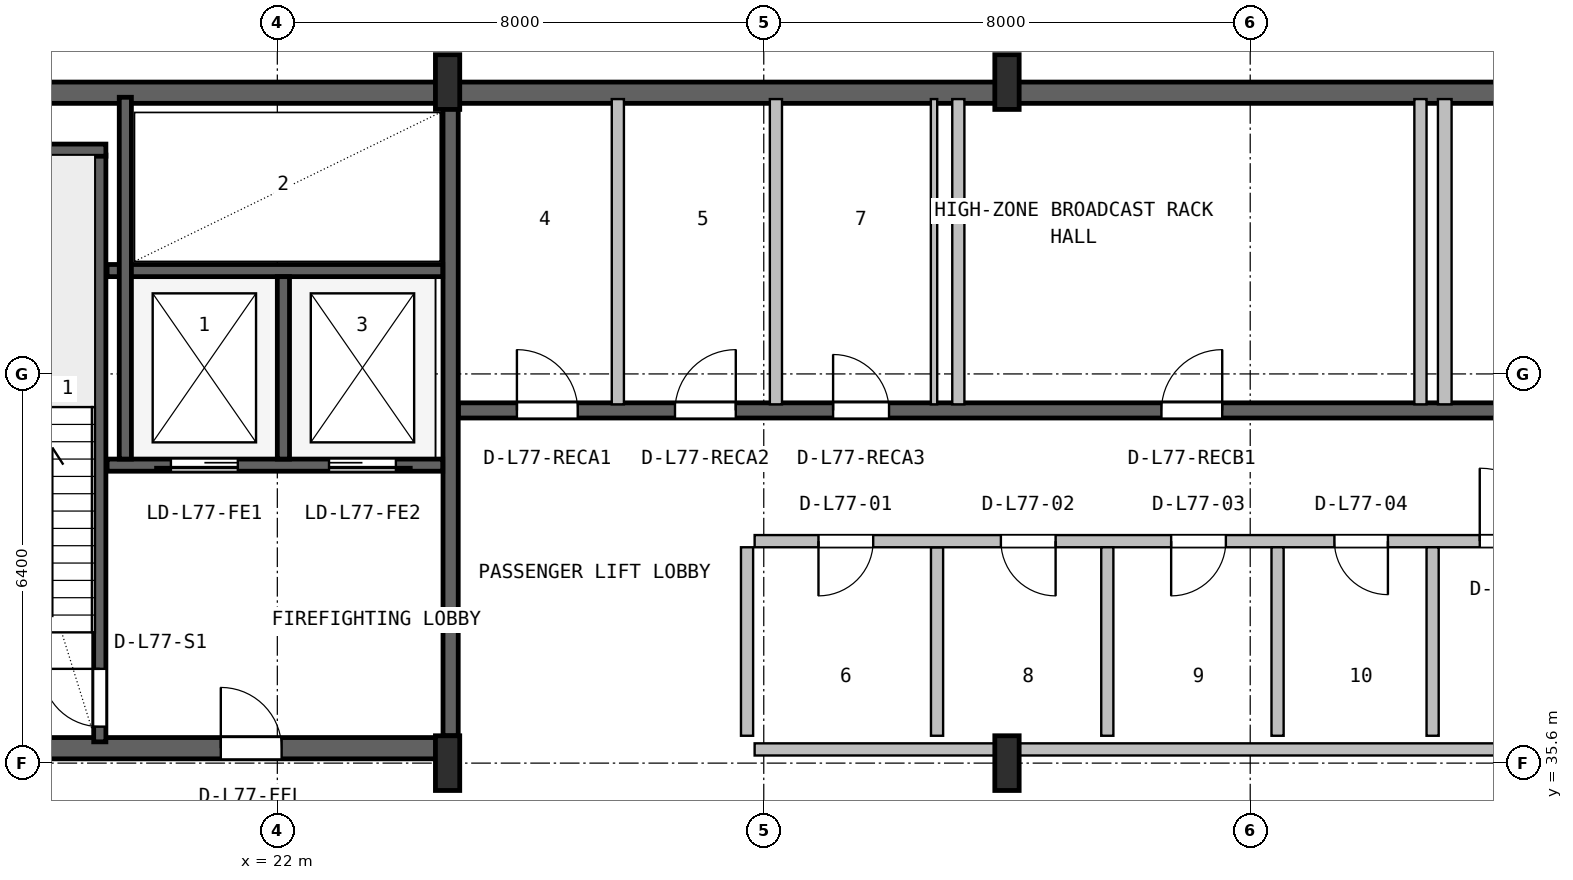
"""IFC4 building model, lengths in metres.
Left out: names, types, materials, properties, quantities, classifications, styles, units other than length and angle.
Written with IfcOpenShell. Run it as: python <this file> out.ifc"""

import sys

from ifc_helpers import new_model, si_unit, direction, frame, frame_2d, origin, origin_2d, place, context, subcontext, project, spatial, rectangle, i_section, extrude, source, transform, mapped, element, fill, save


model = new_model("IFC4")
c1 = context("Model", 3, precision=1e-05, world=origin(), true_north=direction((0.0, 1.0)))
c2 = subcontext(c1, "Body", "Model", "MODEL_VIEW")
j1 = project(units=[si_unit("LENGTHUNIT", "METRE"), si_unit("PLANEANGLEUNIT", "RADIAN")], contexts=[c1])
p1 = place(None, origin())
s1 = spatial("IfcSite", under=j1, at=p1, CompositionType="ELEMENT")
p2 = place(p1, origin())
s2 = spatial("IfcBuilding", under=s1, at=p2, CompositionType="ELEMENT")
p3 = place(p2, frame((0.0, 0.0, 309.8)))
s3 = spatial("IfcBuildingStorey", under=s2, at=p3, CompositionType="ELEMENT", Elevation=309.8)
p4 = place(p3, frame((15.325, 46.625, 0.0), z_axis=(0.0, 0.0, 1.0), x_axis=(1.0, 0.0, 0.0)))
e1 = element("IfcWall", 1, at=p4, inside=s3, PredefinedType="SHEAR", context=c2, shape_type="SweptSolid", body=[
    extrude(rectangle(XDim=37.35, YDim=0.35, at=frame_2d((18.675, 0.0))), origin(), (0.0, 0.0, 1.0), 4.48),
])
p5 = place(p3, frame((15.67, 35.845, 0.0), z_axis=(0.0, 0.0, 1.0), x_axis=(1.0, 0.0, 0.0)))
e2 = element("IfcWall", 2, at=p5, inside=s3, PredefinedType="SHEAR", context=c2, shape_type="SweptSolid", body=[
    extrude(rectangle(XDim=9.13, YDim=0.35, at=frame_2d((4.565, 0.0))), origin(), (0.0, 0.0, 1.0), 4.48),
])
p6 = place(p5, frame((5.4, 0.0, 0.0)))
e3 = element("IfcOpeningElement", 3, at=p6, cuts=e2, PredefinedType="OPENING", context=c2, shape_type="SweptSolid", body=[
    extrude(rectangle(XDim=1.0, YDim=2.1, at=frame_2d((0.5, 1.05))), frame((0.0, 0.185, 0.0), z_axis=(0.0, -1.0, 0.0), x_axis=(1.0, 0.0, 0.0)), (0.0, 0.0, 1.0), 0.37),
])
m1 = source(origin(), c2, "Body", "SweptSolid", [
    extrude(i_section(OverallWidth=0.4, OverallDepth=0.9, WebThickness=0.016, FlangeThickness=0.028, FilletRadius=0.016, at=origin_2d()), origin(), (0.0, 0.0, 1.0), 4.8),
])
for number, where, z_axis, x_axis in (
    (4, (24.8, 35.6, 0.0), (0.0, 0.0, 1.0), (1.0, 0.0, 0.0)),
    (5, (24.8, 46.8, 0.0), (0.0, 0.0, 1.0), (1.0, 0.0, 0.0)),
    (6, (34.0, 35.6, 0.0), (0.0, 0.0, 1.0), (1.0, 0.0, 0.0)),
    (7, (34.0, 46.8, 0.0), (0.0, 0.0, 1.0), (1.0, 0.0, 0.0)),
):
    element("IfcColumn", number, at=place(p3, frame(where, z_axis=z_axis, x_axis=x_axis)), inside=s3, PredefinedType="COLUMN", context=c2, shape_type="MappedRepresentation", body=[
        mapped(m1, transform((0.0, 0.0, 0.0), x_axis=(1.0, 0.0, 0.0), y_axis=(0.0, 1.0, 0.0), z_axis=(0.0, 0.0, 1.0), scale=1.0)),
    ])
p7 = place(p3, frame((19.08, 35.95, 0.0), z_axis=(0.0, 0.0, 1.0), x_axis=(0.0, 1.0, 0.0)))
e8 = element("IfcWall", 8, at=p7, inside=s3, PredefinedType="SHEAR", context=c2, shape_type="SweptSolid", body=[
    extrude(rectangle(XDim=9.65, YDim=0.2, at=frame_2d((4.825, 0.0))), origin(), (0.0, 0.0, 1.0), 4.48),
])
p8 = place(p7, frame((0.25, 0.0, 0.0)))
e9 = element("IfcOpeningElement", 9, at=p8, cuts=e8, PredefinedType="OPENING", context=c2, shape_type="SweptSolid", body=[
    extrude(rectangle(XDim=0.95, YDim=2.1, at=frame_2d((0.475, 1.05))), frame((0.0, 0.11, 0.0), z_axis=(0.0, -1.0, 0.0), x_axis=(1.0, 0.0, 0.0)), (0.0, 0.0, 1.0), 0.22),
])
p9 = place(p3, frame((15.95, 45.68, 0.0), z_axis=(0.0, 0.0, 1.0), x_axis=(1.0, 0.0, 0.0)))
e10 = element("IfcWall", 10, at=p9, inside=s3, PredefinedType="SHEAR", context=c2, shape_type="SweptSolid", body=[
    extrude(rectangle(XDim=3.23, YDim=0.2, at=frame_2d((1.615, 0.0))), origin(), (0.0, 0.0, 1.0), 4.48),
])
p10 = place(p3, frame((24.85, 36.05, 0.0), z_axis=(0.0, 0.0, 1.0), x_axis=(0.0, 1.0, 0.0)))
e11 = element("IfcWall", 11, at=p10, inside=s3, PredefinedType="SHEAR", context=c2, shape_type="SweptSolid", body=[
    extrude(rectangle(XDim=10.45, YDim=0.25, at=frame_2d((5.225, 0.0))), origin(), (0.0, 0.0, 1.0), 4.48),
])
p11 = place(p3, frame((19.2, 40.5, 0.0), z_axis=(0.0, 0.0, 1.0), x_axis=(1.0, 0.0, 0.0)))
e12 = element("IfcWall", 12, at=p11, inside=s3, PredefinedType="SHEAR", context=c2, shape_type="SweptSolid", body=[
    extrude(rectangle(XDim=5.52, YDim=0.2, at=frame_2d((2.76, 0.0))), origin(), (0.0, 0.0, 1.0), 4.48),
])
p12 = place(p11, frame((1.05, 0.0, 0.0)))
e13 = element("IfcOpeningElement", 13, at=p12, cuts=e12, PredefinedType="OPENING", context=c2, shape_type="SweptSolid", body=[
    extrude(rectangle(XDim=1.1, YDim=2.18, at=frame_2d((0.55, 1.09))), frame((0.0, 0.11, 0.0), z_axis=(0.0, -1.0, 0.0), x_axis=(1.0, 0.0, 0.0)), (0.0, 0.0, 1.0), 0.22),
])
p13 = place(p11, frame((3.65, 0.0, 0.0)))
e14 = element("IfcOpeningElement", 14, at=p13, cuts=e12, PredefinedType="OPENING", context=c2, shape_type="SweptSolid", body=[
    extrude(rectangle(XDim=1.1, YDim=2.18, at=frame_2d((0.55, 1.09))), frame((0.0, 0.11, 0.0), z_axis=(0.0, -1.0, 0.0), x_axis=(1.0, 0.0, 0.0)), (0.0, 0.0, 1.0), 0.22),
])
p14 = place(p3, frame((19.2, 43.7, 0.0), z_axis=(0.0, 0.0, 1.0), x_axis=(1.0, 0.0, 0.0)))
e15 = element("IfcWall", 15, at=p14, inside=s3, PredefinedType="SHEAR", context=c2, shape_type="SweptSolid", body=[
    extrude(rectangle(XDim=5.52, YDim=0.2, at=frame_2d((2.76, 0.0))), origin(), (0.0, 0.0, 1.0), 4.48),
])
p15 = place(p3, frame((22.1, 40.6, 0.0), z_axis=(0.0, 0.0, 1.0), x_axis=(0.0, 1.0, 0.0)))
e16 = element("IfcWall", 16, at=p15, inside=s3, PredefinedType="SHEAR", context=c2, shape_type="SweptSolid", body=[
    extrude(rectangle(XDim=3.0, YDim=0.2, at=frame_2d((1.5, 0.0))), origin(), (0.0, 0.0, 1.0), 4.48),
])
p16 = place(p3, frame((19.5, 40.6, 0.0), z_axis=(0.0, 0.0, 1.0), x_axis=(0.0, 1.0, 0.0)))
e17 = element("IfcWall", 17, at=p16, inside=s3, PredefinedType="SHEAR", context=c2, shape_type="SweptSolid", body=[
    extrude(rectangle(XDim=5.95, YDim=0.2, at=frame_2d((2.975, 0.0))), origin(), (0.0, 0.0, 1.0), 4.48),
])
p17 = place(p3, frame((24.98, 41.4, 0.0), z_axis=(0.0, 0.0, 1.0), x_axis=(1.0, 0.0, 0.0)))
e18 = element("IfcWall", 18, at=p17, inside=s3, PredefinedType="SHEAR", context=c2, shape_type="SweptSolid", body=[
    extrude(rectangle(XDim=23.82, YDim=0.25, at=frame_2d((11.91, 0.0))), origin(), (0.0, 0.0, 1.0), 4.48),
])
p18 = place(p17, frame((0.96, 0.0, 0.0)))
e19 = element("IfcOpeningElement", 19, at=p18, cuts=e18, PredefinedType="OPENING", context=c2, shape_type="SweptSolid", body=[
    extrude(rectangle(XDim=1.0, YDim=2.08, at=frame_2d((0.5, 1.04))), frame((0.0, 0.135, 0.0), z_axis=(0.0, -1.0, 0.0), x_axis=(1.0, 0.0, 0.0)), (0.0, 0.0, 1.0), 0.27),
])
p19 = place(p17, frame((3.56, 0.0, 0.0)))
e20 = element("IfcOpeningElement", 20, at=p19, cuts=e18, PredefinedType="OPENING", context=c2, shape_type="SweptSolid", body=[
    extrude(rectangle(XDim=1.0, YDim=2.08, at=frame_2d((0.5, 1.04))), frame((0.0, 0.135, 0.0), z_axis=(0.0, -1.0, 0.0), x_axis=(1.0, 0.0, 0.0)), (0.0, 0.0, 1.0), 0.27),
])
p20 = place(p17, frame((6.16, 0.0, 0.0)))
e21 = element("IfcOpeningElement", 21, at=p20, cuts=e18, PredefinedType="OPENING", context=c2, shape_type="SweptSolid", body=[
    extrude(rectangle(XDim=0.92, YDim=2.08, at=frame_2d((0.46, 1.04))), frame((0.0, 0.135, 0.0), z_axis=(0.0, -1.0, 0.0), x_axis=(1.0, 0.0, 0.0)), (0.0, 0.0, 1.0), 0.27),
])
p21 = place(p17, frame((11.56, 0.0, 0.0)))
e22 = element("IfcOpeningElement", 22, at=p21, cuts=e18, PredefinedType="OPENING", context=c2, shape_type="SweptSolid", body=[
    extrude(rectangle(XDim=1.0, YDim=2.08, at=frame_2d((0.5, 1.04))), frame((0.0, 0.135, 0.0), z_axis=(0.0, -1.0, 0.0), x_axis=(1.0, 0.0, 0.0)), (0.0, 0.0, 1.0), 0.27),
])
p22 = place(p17, frame((19.56, 0.0, 0.0)))
e23 = element("IfcOpeningElement", 23, at=p22, cuts=e18, PredefinedType="OPENING", context=c2, shape_type="SweptSolid", body=[
    extrude(rectangle(XDim=0.92, YDim=2.08, at=frame_2d((0.46, 1.04))), frame((0.0, 0.135, 0.0), z_axis=(0.0, -1.0, 0.0), x_axis=(1.0, 0.0, 0.0)), (0.0, 0.0, 1.0), 0.27),
])
p23 = place(p3, frame((29.85, 35.825, 0.0), z_axis=(0.0, 0.0, 1.0), x_axis=(1.0, 0.0, 0.0)))
e24 = element("IfcWall", 24, at=p23, inside=s3, PredefinedType="SOLIDWALL", context=c2, shape_type="SweptSolid", body=[
    extrude(rectangle(XDim=13.7, YDim=0.2, at=frame_2d((6.85, 0.0))), origin(), (0.0, 0.0, 1.0), 3.505),
])
p24 = place(p3, frame((32.85, 36.05, 0.0), z_axis=(0.0, 0.0, 1.0), x_axis=(0.0, 1.0, 0.0)))
e25 = element("IfcWall", 25, at=p24, inside=s3, PredefinedType="PLUMBINGWALL", context=c2, shape_type="SweptSolid", body=[
    extrude(rectangle(XDim=3.1, YDim=0.2, at=frame_2d((1.55, 0.0))), origin(), (0.0, 0.0, 1.0), 4.46),
])
p25 = place(p3, frame((29.85, 39.25, 0.0), z_axis=(0.0, 0.0, 1.0), x_axis=(1.0, 0.0, 0.0)))
e26 = element("IfcWall", 26, at=p25, inside=s3, PredefinedType="SOLIDWALL", context=c2, shape_type="SweptSolid", body=[
    extrude(rectangle(XDim=13.7, YDim=0.2, at=frame_2d((6.85, 0.0))), origin(), (0.0, 0.0, 1.0), 4.46),
])
p26 = place(p25, frame((1.05, 0.0, 0.0)))
e27 = element("IfcOpeningElement", 27, at=p26, cuts=e26, PredefinedType="OPENING", context=c2, shape_type="SweptSolid", body=[
    extrude(rectangle(XDim=0.9, YDim=2.06, at=frame_2d((0.45, 1.03))), frame((0.0, 0.11, 0.0), z_axis=(0.0, -1.0, 0.0), x_axis=(1.0, 0.0, 0.0)), (0.0, 0.0, 1.0), 0.22),
])
p27 = place(p25, frame((4.05, 0.0, 0.0)))
e28 = element("IfcOpeningElement", 28, at=p27, cuts=e26, PredefinedType="OPENING", context=c2, shape_type="SweptSolid", body=[
    extrude(rectangle(XDim=0.9, YDim=2.06, at=frame_2d((0.45, 1.03))), frame((0.0, 0.11, 0.0), z_axis=(0.0, -1.0, 0.0), x_axis=(1.0, 0.0, 0.0)), (0.0, 0.0, 1.0), 0.22),
])
p28 = place(p25, frame((6.85, 0.0, 0.0)))
e29 = element("IfcOpeningElement", 29, at=p28, cuts=e26, PredefinedType="OPENING", context=c2, shape_type="SweptSolid", body=[
    extrude(rectangle(XDim=0.9, YDim=2.06, at=frame_2d((0.45, 1.03))), frame((0.0, 0.11, 0.0), z_axis=(0.0, -1.0, 0.0), x_axis=(1.0, 0.0, 0.0)), (0.0, 0.0, 1.0), 0.22),
])
p29 = place(p25, frame((9.535, 0.0, 0.0)))
e30 = element("IfcOpeningElement", 30, at=p29, cuts=e26, PredefinedType="OPENING", context=c2, shape_type="SweptSolid", body=[
    extrude(rectangle(XDim=0.88, YDim=2.06, at=frame_2d((0.44, 1.03))), frame((0.0, 0.11, 0.0), z_axis=(0.0, -1.0, 0.0), x_axis=(1.0, 0.0, 0.0)), (0.0, 0.0, 1.0), 0.22),
])
p30 = place(p25, frame((11.925, 0.0, 0.0)))
e31 = element("IfcOpeningElement", 31, at=p30, cuts=e26, PredefinedType="OPENING", context=c2, shape_type="SweptSolid", body=[
    extrude(rectangle(XDim=1.2, YDim=2.1, at=frame_2d((0.6, 1.05))), frame((0.0, 0.11, 0.0), z_axis=(0.0, -1.0, 0.0), x_axis=(1.0, 0.0, 0.0)), (0.0, 0.0, 1.0), 0.22),
])
for number, where, z_axis, x_axis in (
    (32, (29.725, 36.05, 0.0), (0.0, 0.0, 1.0), (0.0, 1.0, 0.0)),
    (33, (35.65, 36.05, 0.0), (0.0, 0.0, 1.0), (0.0, 1.0, 0.0)),
    (34, (38.45, 36.05, 0.0), (0.0, 0.0, 1.0), (0.0, 1.0, 0.0)),
):
    element("IfcWall", number, at=place(p3, frame(where, z_axis=z_axis, x_axis=x_axis)), inside=s3, PredefinedType="PLUMBINGWALL", context=c2, shape_type="SweptSolid", body=[
        extrude(rectangle(XDim=3.1, YDim=0.2, at=frame_2d((1.55, 0.0))), origin(), (0.0, 0.0, 1.0), 4.46),
    ])
p31 = place(p3, frame((41.0, 36.05, 0.0), z_axis=(0.0, 0.0, 1.0), x_axis=(0.0, 1.0, 0.0)))
e35 = element("IfcWall", 35, at=p31, inside=s3, PredefinedType="SOLIDWALL", context=c2, shape_type="SweptSolid", body=[
    extrude(rectangle(XDim=3.1, YDim=0.2, at=frame_2d((1.55, 0.0))), origin(), (0.0, 0.0, 1.0), 4.46),
])
for number, where, z_axis, x_axis in (
    (36, (27.6, 41.5, 0.0), (0.0, 0.0, 1.0), (0.0, 1.0, 0.0)),
    (37, (30.2, 41.5, 0.0), (0.0, 0.0, 1.0), (0.0, 1.0, 0.0)),
):
    element("IfcWall", number, at=place(p3, frame(where, z_axis=z_axis, x_axis=x_axis)), inside=s3, PredefinedType="SOLIDWALL", context=c2, shape_type="SweptSolid", body=[
        extrude(rectangle(XDim=5.02, YDim=0.2, at=frame_2d((2.51, 0.0))), origin(), (0.0, 0.0, 1.0), 4.46),
    ])
p32 = place(p3, frame((32.8, 41.5, 0.0), z_axis=(0.0, 0.0, 1.0), x_axis=(0.0, 1.0, 0.0)))
e38 = element("IfcWall", 38, at=p32, inside=s3, PredefinedType="PARTITIONING", context=c2, shape_type="SweptSolid", body=[
    extrude(rectangle(XDim=5.02, YDim=0.105, at=frame_2d((2.51, 0.0))), origin(), (0.0, 0.0, 1.0), 4.46),
])
for number, where, z_axis, x_axis in (
    (39, (40.8, 41.5, 0.0), (0.0, 0.0, 1.0), (0.0, 1.0, 0.0)),
    (40, (33.2, 41.5, 0.0), (0.0, 0.0, 1.0), (0.0, 1.0, 0.0)),
):
    element("IfcWall", number, at=place(p3, frame(where, z_axis=z_axis, x_axis=x_axis)), inside=s3, PredefinedType="SOLIDWALL", context=c2, shape_type="SweptSolid", body=[
        extrude(rectangle(XDim=5.02, YDim=0.2, at=frame_2d((2.51, 0.0))), origin(), (0.0, 0.0, 1.0), 4.46),
    ])
p33 = place(p3, frame((41.2, 41.5, 0.0), z_axis=(0.0, 0.0, 1.0), x_axis=(0.0, 1.0, 0.0)))
e41 = element("IfcWall", 41, at=p33, inside=s3, PredefinedType="PARTITIONING", context=c2, shape_type="SweptSolid", body=[
    extrude(rectangle(XDim=5.02, YDim=0.225, at=frame_2d((2.51, 0.0))), origin(), (0.0, 0.0, 1.0), 4.46),
])
m2 = source(origin(), c2, "Body", "SweptSolid", [
    extrude(rectangle(XDim=0.95, YDim=2.1, at=frame_2d((0.475, 1.05))), frame((0.0, 0.025, 0.0), z_axis=(0.0, -1.0, 0.0), x_axis=(1.0, 0.0, 0.0)), (0.0, 0.0, 1.0), 0.05),
])
p34 = place(p8, origin())
e42 = element("IfcDoor", 42, at=p34, inside=s3, OperationType="SINGLE_SWING_RIGHT", PredefinedType="DOOR", context=c2, shape_type="MappedRepresentation", body=[
    mapped(m2, transform((0.0, 0.0, 0.0), x_axis=(1.0, 0.0, 0.0), y_axis=(0.0, 1.0, 0.0), z_axis=(0.0, 0.0, 1.0), scale=1.0)),
])
fill(e9, e42)
m3 = source(origin(), c2, "Body", "SweptSolid", [
    extrude(rectangle(XDim=1.0, YDim=2.1, at=frame_2d((0.5, 1.05))), frame((0.0, 0.025, 0.0), z_axis=(0.0, -1.0, 0.0), x_axis=(1.0, 0.0, 0.0)), (0.0, 0.0, 1.0), 0.05),
])
p35 = place(p6, origin())
e43 = element("IfcDoor", 43, at=p35, inside=s3, OperationType="SINGLE_SWING_LEFT", PredefinedType="DOOR", context=c2, shape_type="MappedRepresentation", body=[
    mapped(m3, transform((0.0, 0.0, 0.0), x_axis=(1.0, 0.0, 0.0), y_axis=(0.0, 1.0, 0.0), z_axis=(0.0, 0.0, 1.0), scale=1.0)),
])
fill(e3, e43)
m4 = source(origin(), c2, "Body", "SweptSolid", [
    extrude(rectangle(XDim=1.1, YDim=2.18, at=frame_2d((0.55, 1.09))), frame((0.0, 0.025, 0.0), z_axis=(0.0, -1.0, 0.0), x_axis=(1.0, 0.0, 0.0)), (0.0, 0.0, 1.0), 0.05),
])
p36 = place(p12, frame((1.1, 0.0, 0.0), z_axis=(0.0, 0.0, 1.0), x_axis=(-1.0, 0.0, 0.0)))
e44 = element("IfcDoor", 44, at=p36, inside=s3, OperationType="SLIDING_TO_LEFT", PredefinedType="DOOR", context=c2, shape_type="MappedRepresentation", body=[
    mapped(m4, transform((0.0, 0.0, 0.0), x_axis=(1.0, 0.0, 0.0), y_axis=(0.0, 1.0, 0.0), z_axis=(0.0, 0.0, 1.0), scale=1.0)),
])
fill(e13, e44)
p37 = place(p13, frame((1.1, 0.0, 0.0), z_axis=(0.0, 0.0, 1.0), x_axis=(-1.0, 0.0, 0.0)))
e45 = element("IfcDoor", 45, at=p37, inside=s3, OperationType="SLIDING_TO_RIGHT", PredefinedType="DOOR", context=c2, shape_type="MappedRepresentation", body=[
    mapped(m4, transform((0.0, 0.0, 0.0), x_axis=(1.0, 0.0, 0.0), y_axis=(0.0, 1.0, 0.0), z_axis=(0.0, 0.0, 1.0), scale=1.0)),
])
fill(e14, e45)
m5 = source(origin(), c2, "Body", "SweptSolid", [
    extrude(rectangle(XDim=1.0, YDim=2.08, at=frame_2d((0.5, 1.04))), frame((0.0, 0.025, 0.0), z_axis=(0.0, -1.0, 0.0), x_axis=(1.0, 0.0, 0.0)), (0.0, 0.0, 1.0), 0.05),
])
p38 = place(p18, origin())
e46 = element("IfcDoor", 46, at=p38, inside=s3, OperationType="SINGLE_SWING_LEFT", PredefinedType="DOOR", context=c2, shape_type="MappedRepresentation", body=[
    mapped(m5, transform((0.0, 0.0, 0.0), x_axis=(1.0, 0.0, 0.0), y_axis=(0.0, 1.0, 0.0), z_axis=(0.0, 0.0, 1.0), scale=1.0)),
])
fill(e19, e46)
p39 = place(p19, origin())
e47 = element("IfcDoor", 47, at=p39, inside=s3, OperationType="SINGLE_SWING_RIGHT", PredefinedType="DOOR", context=c2, shape_type="MappedRepresentation", body=[
    mapped(m5, transform((0.0, 0.0, 0.0), x_axis=(1.0, 0.0, 0.0), y_axis=(0.0, 1.0, 0.0), z_axis=(0.0, 0.0, 1.0), scale=1.0)),
])
fill(e20, e47)
m6 = source(origin(), c2, "Body", "SweptSolid", [
    extrude(rectangle(XDim=0.92, YDim=2.08, at=frame_2d((0.46, 1.04))), frame((0.0, 0.025, 0.0), z_axis=(0.0, -1.0, 0.0), x_axis=(1.0, 0.0, 0.0)), (0.0, 0.0, 1.0), 0.05),
])
p40 = place(p20, origin())
e48 = element("IfcDoor", 48, at=p40, inside=s3, OperationType="SINGLE_SWING_LEFT", PredefinedType="DOOR", context=c2, shape_type="MappedRepresentation", body=[
    mapped(m6, transform((0.0, 0.0, 0.0), x_axis=(1.0, 0.0, 0.0), y_axis=(0.0, 1.0, 0.0), z_axis=(0.0, 0.0, 1.0), scale=1.0)),
])
fill(e21, e48)
p41 = place(p21, origin())
e49 = element("IfcDoor", 49, at=p41, inside=s3, OperationType="SINGLE_SWING_RIGHT", PredefinedType="DOOR", context=c2, shape_type="MappedRepresentation", body=[
    mapped(m5, transform((0.0, 0.0, 0.0), x_axis=(1.0, 0.0, 0.0), y_axis=(0.0, 1.0, 0.0), z_axis=(0.0, 0.0, 1.0), scale=1.0)),
])
fill(e22, e49)
m7 = source(origin(), c2, "Body", "SweptSolid", [
    extrude(rectangle(XDim=0.9, YDim=2.06, at=frame_2d((0.45, 1.03))), frame((0.0, 0.025, 0.0), z_axis=(0.0, -1.0, 0.0), x_axis=(1.0, 0.0, 0.0)), (0.0, 0.0, 1.0), 0.05),
])
p42 = place(p26, frame((0.9, 0.0, 0.0), z_axis=(0.0, 0.0, 1.0), x_axis=(-1.0, 0.0, 0.0)))
e50 = element("IfcDoor", 50, at=p42, inside=s3, OperationType="SINGLE_SWING_LEFT", PredefinedType="DOOR", context=c2, shape_type="MappedRepresentation", body=[
    mapped(m7, transform((0.0, 0.0, 0.0), x_axis=(1.0, 0.0, 0.0), y_axis=(0.0, 1.0, 0.0), z_axis=(0.0, 0.0, 1.0), scale=1.0)),
])
fill(e27, e50)
p43 = place(p27, frame((0.9, 0.0, 0.0), z_axis=(0.0, 0.0, 1.0), x_axis=(-1.0, 0.0, 0.0)))
e51 = element("IfcDoor", 51, at=p43, inside=s3, OperationType="SINGLE_SWING_RIGHT", PredefinedType="DOOR", context=c2, shape_type="MappedRepresentation", body=[
    mapped(m7, transform((0.0, 0.0, 0.0), x_axis=(1.0, 0.0, 0.0), y_axis=(0.0, 1.0, 0.0), z_axis=(0.0, 0.0, 1.0), scale=1.0)),
])
fill(e28, e51)
p44 = place(p28, frame((0.9, 0.0, 0.0), z_axis=(0.0, 0.0, 1.0), x_axis=(-1.0, 0.0, 0.0)))
e52 = element("IfcDoor", 52, at=p44, inside=s3, OperationType="SINGLE_SWING_LEFT", PredefinedType="DOOR", context=c2, shape_type="MappedRepresentation", body=[
    mapped(m7, transform((0.0, 0.0, 0.0), x_axis=(1.0, 0.0, 0.0), y_axis=(0.0, 1.0, 0.0), z_axis=(0.0, 0.0, 1.0), scale=1.0)),
])
fill(e29, e52)
m8 = source(origin(), c2, "Body", "SweptSolid", [
    extrude(rectangle(XDim=0.88, YDim=2.06, at=frame_2d((0.44, 1.03))), frame((0.0, 0.025, 0.0), z_axis=(0.0, -1.0, 0.0), x_axis=(1.0, 0.0, 0.0)), (0.0, 0.0, 1.0), 0.05),
])
p45 = place(p29, frame((0.88, 0.0, 0.0), z_axis=(0.0, 0.0, 1.0), x_axis=(-1.0, 0.0, 0.0)))
e53 = element("IfcDoor", 53, at=p45, inside=s3, OperationType="SINGLE_SWING_RIGHT", PredefinedType="DOOR", context=c2, shape_type="MappedRepresentation", body=[
    mapped(m8, transform((0.0, 0.0, 0.0), x_axis=(1.0, 0.0, 0.0), y_axis=(0.0, 1.0, 0.0), z_axis=(0.0, 0.0, 1.0), scale=1.0)),
])
fill(e30, e53)
m9 = source(origin(), c2, "Body", "SweptSolid", [
    extrude(rectangle(XDim=1.2, YDim=2.1, at=frame_2d((0.6, 1.05))), frame((0.0, 0.025, 0.0), z_axis=(0.0, -1.0, 0.0), x_axis=(1.0, 0.0, 0.0)), (0.0, 0.0, 1.0), 0.05),
])
p46 = place(p30, origin())
e54 = element("IfcDoor", 54, at=p46, inside=s3, OperationType="SINGLE_SWING_LEFT", PredefinedType="DOOR", context=c2, shape_type="MappedRepresentation", body=[
    mapped(m9, transform((0.0, 0.0, 0.0), x_axis=(1.0, 0.0, 0.0), y_axis=(0.0, 1.0, 0.0), z_axis=(0.0, 0.0, 1.0), scale=1.0)),
])
fill(e31, e54)
save(model, sys.argv[1])
